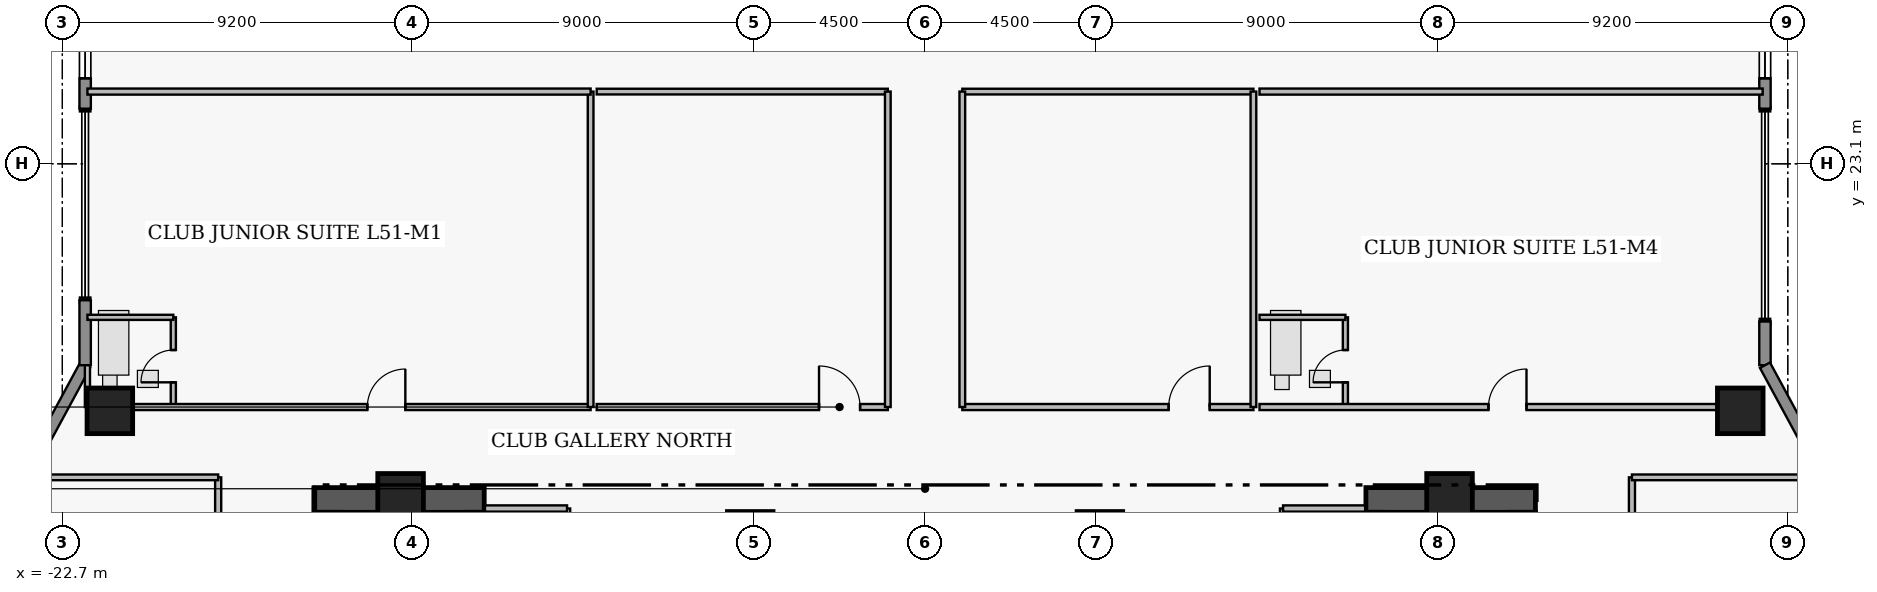
"""IFC4 building model, lengths in metres.
Left out: names, types, materials, properties, quantities, classifications, styles, units other than length and angle.
Written with IfcOpenShell. Run it as: python <this file> out.ifc"""

import sys

from ifc_helpers import new_model, si_unit, direction, frame, frame_2d, origin, origin_2d, place, context, subcontext, project, spatial, rectangle, extrude, element, fill, save


model = new_model("IFC4")
c1 = context("Model", 3, precision=1e-05, world=origin(), true_north=direction((0.0, 1.0)))
c2 = subcontext(c1, "Body", "Model", "MODEL_VIEW")
j1 = project(units=[si_unit("LENGTHUNIT", "METRE"), si_unit("PLANEANGLEUNIT", "RADIAN")], contexts=[c1])
p1 = place(None, origin())
s1 = spatial("IfcSite", under=j1, at=p1, CompositionType="ELEMENT")
p2 = place(p1, origin())
s2 = spatial("IfcBuilding", under=s1, at=p2, CompositionType="ELEMENT")
p3 = place(p2, frame((0.0, 0.0, 203.65)))
s3 = spatial("IfcBuildingStorey", under=s2, at=p3, CompositionType="ELEMENT", Elevation=203.65)
for number, where, z_axis, x_axis in (
    (1, (-16.06, 14.255, 0.0), (0.0, 0.0, 1.0), (1.0, 0.0, 0.0)),
    (2, (11.6, 14.255, 0.0), (0.0, 0.0, 1.0), (1.0, 0.0, 0.0)),
):
    element("IfcWall", number, at=place(p3, frame(where, z_axis=z_axis, x_axis=x_axis)), inside=s3, PredefinedType="SHEAR", context=c2, shape_type="SweptSolid", body=[
        extrude(rectangle(XDim=4.46, YDim=0.65, at=frame_2d((2.23, 0.0))), origin(), (0.0, 0.0, 1.0), 3.56),
    ])
for number, where, z_axis, x_axis in (
    (3, (-13.8, 14.35, 0.0), (0.0, 0.0, 1.0), (1.0, 0.0, 0.0)),
    (4, (-4.6, 13.35, 0.0), (0.0, 0.0, 1.0), (1.0, 0.0, 0.0)),
    (5, (4.6, 13.35, 0.0), (0.0, 0.0, 1.0), (1.0, 0.0, 0.0)),
    (6, (13.8, 14.35, 0.0), (0.0, 0.0, 1.0), (1.0, 0.0, 0.0)),
    (7, (-21.45, 16.6, 0.0), (0.0, 0.0, 1.0), (1.0, 0.0, 0.0)),
    (8, (21.45, 16.6, 0.0), (0.0, 0.0, 1.0), (1.0, 0.0, 0.0)),
):
    element("IfcColumn", number, at=place(p3, frame(where, z_axis=z_axis, x_axis=x_axis)), inside=s3, PredefinedType="COLUMN", context=c2, shape_type="SweptSolid", body=[
        extrude(rectangle(XDim=1.2, YDim=1.2, at=origin_2d()), origin(), (0.0, 0.0, 1.0), 3.75),
    ])
p4 = place(p3, frame((-24.7, 13.0, 0.0), z_axis=(0.0, 0.0, 1.0), x_axis=(0.476258655584, 0.879305233114, 0.0)))
e9 = element("IfcWall", 9, at=p4, inside=s3, PredefinedType="STANDARD", context=c2, shape_type="SweptSolid", body=[
    extrude(rectangle(XDim=5.459, YDim=0.3, at=frame_2d((2.729, 0.0))), origin(), (0.0, 0.0, 1.0), 3.53),
])
p5 = place(p3, frame((-22.1, 17.8, 0.0), z_axis=(0.0, 0.0, 1.0), x_axis=(0.0, 1.0, 0.0)))
e10 = element("IfcWall", 10, at=p5, inside=s3, PredefinedType="STANDARD", context=c2, shape_type="SweptSolid", body=[
    extrude(rectangle(XDim=1.71, YDim=0.3, at=frame_2d((0.855, 0.0))), origin(), (0.0, 0.0, 1.0), 3.53),
])
p6 = place(p3, frame((-22.1, 24.55, 0.0), z_axis=(0.0, 0.0, 1.0), x_axis=(0.0, 1.0, 0.0)))
e11 = element("IfcWall", 11, at=p6, inside=s3, PredefinedType="STANDARD", context=c2, shape_type="SweptSolid", body=[
    extrude(rectangle(XDim=5.65, YDim=0.3, at=frame_2d((2.825, 0.0))), origin(), (0.0, 0.0, 1.0), 3.53),
])
p7 = place(p6, frame((0.8, 0.0, 0.95)))
e12 = element("IfcOpeningElement", 12, at=p7, cuts=e11, PredefinedType="OPENING", context=c2, shape_type="SweptSolid", body=[
    extrude(rectangle(XDim=1.15, YDim=1.55, at=frame_2d((0.575, 0.775))), frame((0.0, 0.16, 0.0), z_axis=(0.0, -1.0, 0.0), x_axis=(1.0, 0.0, 0.0)), (0.0, 0.0, 1.0), 0.32),
])
p8 = place(p6, frame((2.905, 0.0, 0.95)))
e13 = element("IfcOpeningElement", 13, at=p8, cuts=e11, PredefinedType="OPENING", context=c2, shape_type="SweptSolid", body=[
    extrude(rectangle(XDim=1.15, YDim=1.55, at=frame_2d((0.575, 0.775))), frame((0.0, 0.16, 0.0), z_axis=(0.0, -1.0, 0.0), x_axis=(1.0, 0.0, 0.0)), (0.0, 0.0, 1.0), 0.32),
])
p9 = place(p3, frame((22.1, 30.2, 0.0), z_axis=(0.0, 0.0, 1.0), x_axis=(0.0, -1.0, 0.0)))
e14 = element("IfcWall", 14, at=p9, inside=s3, PredefinedType="STANDARD", context=c2, shape_type="SweptSolid", body=[
    extrude(rectangle(XDim=5.65, YDim=0.3, at=frame_2d((2.825, 0.0))), origin(), (0.0, 0.0, 1.0), 3.53),
])
p10 = place(p9, frame((0.935, 0.0, 0.85)))
e15 = element("IfcOpeningElement", 15, at=p10, cuts=e14, PredefinedType="OPENING", context=c2, shape_type="SweptSolid", body=[
    extrude(rectangle(XDim=1.6, YDim=1.8, at=frame_2d((0.8, 0.9))), frame((0.0, 0.16, 0.0), z_axis=(0.0, -1.0, 0.0), x_axis=(1.0, 0.0, 0.0)), (0.0, 0.0, 1.0), 0.32),
])
p11 = place(p9, frame((3.7, 0.0, 0.95)))
e16 = element("IfcOpeningElement", 16, at=p11, cuts=e14, PredefinedType="OPENING", context=c2, shape_type="SweptSolid", body=[
    extrude(rectangle(XDim=1.15, YDim=1.55, at=frame_2d((0.575, 0.775))), frame((0.0, 0.16, 0.0), z_axis=(0.0, -1.0, 0.0), x_axis=(1.0, 0.0, 0.0)), (0.0, 0.0, 1.0), 0.32),
])
p12 = place(p3, frame((22.1, 18.95, 0.0), z_axis=(0.0, 0.0, 1.0), x_axis=(0.0, -1.0, 0.0)))
e17 = element("IfcWall", 17, at=p12, inside=s3, PredefinedType="STANDARD", context=c2, shape_type="SweptSolid", body=[
    extrude(rectangle(XDim=1.15, YDim=0.3, at=frame_2d((0.575, 0.0))), origin(), (0.0, 0.0, 1.0), 3.53),
])
p13 = place(p3, frame((22.1, 17.8, 0.0), z_axis=(0.0, 0.0, 1.0), x_axis=(0.476258655584, -0.879305233114, 0.0)))
e18 = element("IfcWall", 18, at=p13, inside=s3, PredefinedType="STANDARD", context=c2, shape_type="SweptSolid", body=[
    extrude(rectangle(XDim=5.459, YDim=0.3, at=frame_2d((2.729, 0.0))), origin(), (0.0, 0.0, 1.0), 3.53),
])
p14 = place(p3, frame((-19.78, 16.7, 0.0), z_axis=(0.0, 0.0, 1.0), x_axis=(0.0, 1.0, 0.0)))
e19 = element("IfcWall", 19, at=p14, inside=s3, PredefinedType="PLUMBINGWALL", context=c2, shape_type="SweptSolid", body=[
    extrude(rectangle(XDim=2.36, YDim=0.135, at=frame_2d((1.18, 0.0))), origin(), (0.0, 0.0, 1.0), 3.53),
])
p15 = place(p14, frame((0.65, 0.0, 0.0)))
e20 = element("IfcOpeningElement", 20, at=p15, cuts=e19, PredefinedType="OPENING", context=c2, shape_type="SweptSolid", body=[
    extrude(rectangle(XDim=0.85, YDim=2.1, at=frame_2d((0.425, 1.05))), frame((0.0, 0.077, 0.0), z_axis=(0.0, -1.0, 0.0), x_axis=(1.0, 0.0, 0.0)), (0.0, 0.0, 1.0), 0.155),
])
p16 = place(p3, frame((-22.04, 16.7, 0.0), z_axis=(0.0, 0.0, 1.0), x_axis=(1.0, 0.0, 0.0)))
e21 = element("IfcWall", 21, at=p16, inside=s3, PredefinedType="PARTITIONING", context=c2, shape_type="SweptSolid", body=[
    extrude(rectangle(XDim=13.24, YDim=0.16, at=frame_2d((6.62, 0.0))), origin(), (0.0, 0.0, 1.0), 3.124),
])
p17 = place(p16, frame((7.365, 0.0, 0.0)))
e22 = element("IfcOpeningElement", 22, at=p17, cuts=e21, PredefinedType="OPENING", context=c2, shape_type="SweptSolid", body=[
    extrude(rectangle(XDim=1.0, YDim=2.15, at=frame_2d((0.5, 1.075))), frame((0.0, 0.09, 0.0), z_axis=(0.0, -1.0, 0.0), x_axis=(1.0, 0.0, 0.0)), (0.0, 0.0, 1.0), 0.18),
])
p18 = place(p3, frame((-8.64, 16.7, 0.0), z_axis=(0.0, 0.0, 1.0), x_axis=(1.0, 0.0, 0.0)))
e23 = element("IfcWall", 23, at=p18, inside=s3, PredefinedType="PARTITIONING", context=c2, shape_type="SweptSolid", body=[
    extrude(rectangle(XDim=7.66, YDim=0.16, at=frame_2d((3.83, 0.0))), origin(), (0.0, 0.0, 1.0), 3.124),
])
p19 = place(p18, frame((5.85, 0.0, 0.0)))
e24 = element("IfcOpeningElement", 24, at=p19, cuts=e23, PredefinedType="OPENING", context=c2, shape_type="SweptSolid", body=[
    extrude(rectangle(XDim=1.08, YDim=2.18, at=frame_2d((0.54, 1.09))), frame((0.0, 0.09, 0.0), z_axis=(0.0, -1.0, 0.0), x_axis=(1.0, 0.0, 0.0)), (0.0, 0.0, 1.0), 0.18),
])
p20 = place(p3, frame((0.98, 16.7, 0.0), z_axis=(0.0, 0.0, 1.0), x_axis=(1.0, 0.0, 0.0)))
e25 = element("IfcWall", 25, at=p20, inside=s3, PredefinedType="PARTITIONING", context=c2, shape_type="SweptSolid", body=[
    extrude(rectangle(XDim=7.66, YDim=0.16, at=frame_2d((3.83, 0.0))), origin(), (0.0, 0.0, 1.0), 3.124),
])
p21 = place(p20, frame((5.43, 0.0, 0.0)))
e26 = element("IfcOpeningElement", 26, at=p21, cuts=e25, PredefinedType="OPENING", context=c2, shape_type="SweptSolid", body=[
    extrude(rectangle(XDim=1.08, YDim=2.18, at=frame_2d((0.54, 1.09))), frame((0.0, 0.09, 0.0), z_axis=(0.0, -1.0, 0.0), x_axis=(1.0, 0.0, 0.0)), (0.0, 0.0, 1.0), 0.18),
])
p22 = place(p3, frame((11.06, 16.7, 0.0), z_axis=(0.0, 0.0, 1.0), x_axis=(0.0, 1.0, 0.0)))
e27 = element("IfcWall", 27, at=p22, inside=s3, PredefinedType="PLUMBINGWALL", context=c2, shape_type="SweptSolid", body=[
    extrude(rectangle(XDim=2.36, YDim=0.135, at=frame_2d((1.18, 0.0))), origin(), (0.0, 0.0, 1.0), 3.53),
])
p23 = place(p22, frame((0.65, 0.0, 0.0)))
e28 = element("IfcOpeningElement", 28, at=p23, cuts=e27, PredefinedType="OPENING", context=c2, shape_type="SweptSolid", body=[
    extrude(rectangle(XDim=0.85, YDim=2.1, at=frame_2d((0.425, 1.05))), frame((0.0, 0.077, 0.0), z_axis=(0.0, -1.0, 0.0), x_axis=(1.0, 0.0, 0.0)), (0.0, 0.0, 1.0), 0.155),
])
p24 = place(p3, frame((8.8, 16.7, 0.0), z_axis=(0.0, 0.0, 1.0), x_axis=(1.0, 0.0, 0.0)))
e29 = element("IfcWall", 29, at=p24, inside=s3, PredefinedType="PARTITIONING", context=c2, shape_type="SweptSolid", body=[
    extrude(rectangle(XDim=13.24, YDim=0.16, at=frame_2d((6.62, 0.0))), origin(), (0.0, 0.0, 1.0), 3.124),
])
p25 = place(p24, frame((6.025, 0.0, 0.0)))
e30 = element("IfcOpeningElement", 30, at=p25, cuts=e29, PredefinedType="OPENING", context=c2, shape_type="SweptSolid", body=[
    extrude(rectangle(XDim=1.0, YDim=2.15, at=frame_2d((0.5, 1.075))), frame((0.0, 0.09, 0.0), z_axis=(0.0, -1.0, 0.0), x_axis=(1.0, 0.0, 0.0)), (0.0, 0.0, 1.0), 0.18),
])
p26 = place(p3, frame((18.6, 10.18, 0.0), z_axis=(0.0, 0.0, 1.0), x_axis=(0.0, 1.0, 0.0)))
e31 = element("IfcWall", 31, at=p26, inside=s3, PredefinedType="PARTITIONING", context=c2, shape_type="SweptSolid", body=[
    extrude(rectangle(XDim=4.67, YDim=0.16, at=frame_2d((2.335, 0.0))), origin(), (0.0, 0.0, 1.0), 3.53),
])
p27 = place(p26, frame((1.875, 0.0, 0.0)))
e32 = element("IfcOpeningElement", 32, at=p27, cuts=e31, PredefinedType="OPENING", context=c2, shape_type="SweptSolid", body=[
    extrude(rectangle(XDim=0.92, YDim=2.12, at=frame_2d((0.46, 1.06))), frame((0.0, 0.09, 0.0), z_axis=(0.0, -1.0, 0.0), x_axis=(1.0, 0.0, 0.0)), (0.0, 0.0, 1.0), 0.18),
])
p28 = place(p3, frame((-18.6, 8.06, 0.0), z_axis=(0.0, 0.0, 1.0), x_axis=(0.0, 1.0, 0.0)))
e33 = element("IfcWall", 33, at=p28, inside=s3, PredefinedType="PARTITIONING", context=c2, shape_type="SweptSolid", body=[
    extrude(rectangle(XDim=6.79, YDim=0.16, at=frame_2d((3.395, 0.0))), origin(), (0.0, 0.0, 1.0), 3.53),
])
p29 = place(p28, frame((2.92, 0.0, 0.0)))
e34 = element("IfcOpeningElement", 34, at=p29, cuts=e33, PredefinedType="OPENING", context=c2, shape_type="SweptSolid", body=[
    extrude(rectangle(XDim=0.95, YDim=2.15, at=frame_2d((0.475, 1.075))), frame((0.0, 0.09, 0.0), z_axis=(0.0, -1.0, 0.0), x_axis=(1.0, 0.0, 0.0)), (0.0, 0.0, 1.0), 0.18),
])
p30 = place(p3, frame((-9.42, 11.07, 0.0), z_axis=(0.0, 0.0, 1.0), x_axis=(0.0, 1.0, 0.0)))
e35 = element("IfcWall", 35, at=p30, inside=s3, PredefinedType="PARTITIONING", context=c2, shape_type="SweptSolid", body=[
    extrude(rectangle(XDim=2.96, YDim=0.165, at=frame_2d((1.48, 0.0))), origin(), (0.0, 0.0, 1.0), 3.53),
])
p31 = place(p3, frame((-11.58, 14.03, 0.0), z_axis=(0.0, 0.0, 1.0), x_axis=(1.0, 0.0, 0.0)))
e36 = element("IfcWall", 36, at=p31, inside=s3, PredefinedType="PARTITIONING", context=c2, shape_type="SweptSolid", body=[
    extrude(rectangle(XDim=2.16, YDim=0.165, at=frame_2d((1.08, 0.0))), origin(), (0.0, 0.0, 1.0), 3.53),
])
p32 = place(p3, frame((9.42, 11.07, 0.0), z_axis=(0.0, 0.0, 1.0), x_axis=(0.0, 1.0, 0.0)))
e37 = element("IfcWall", 37, at=p32, inside=s3, PredefinedType="PARTITIONING", context=c2, shape_type="SweptSolid", body=[
    extrude(rectangle(XDim=2.96, YDim=0.165, at=frame_2d((1.48, 0.0))), origin(), (0.0, 0.0, 1.0), 3.53),
])
p33 = place(p3, frame((9.42, 14.03, 0.0), z_axis=(0.0, 0.0, 1.0), x_axis=(1.0, 0.0, 0.0)))
e38 = element("IfcWall", 38, at=p33, inside=s3, PredefinedType="PARTITIONING", context=c2, shape_type="SweptSolid", body=[
    extrude(rectangle(XDim=2.16, YDim=0.165, at=frame_2d((1.08, 0.0))), origin(), (0.0, 0.0, 1.0), 3.53),
])
p34 = place(p3, frame((-22.04, 19.06, 0.0), z_axis=(0.0, 0.0, 1.0), x_axis=(1.0, 0.0, 0.0)))
e39 = element("IfcWall", 39, at=p34, inside=s3, PredefinedType="PLUMBINGWALL", context=c2, shape_type="SweptSolid", body=[
    extrude(rectangle(XDim=2.26, YDim=0.135, at=frame_2d((1.13, 0.0))), origin(), (0.0, 0.0, 1.0), 3.53),
])
p35 = place(p3, frame((-22.04, 16.7, 0.0), z_axis=(0.0, 0.0, 1.0), x_axis=(0.0, 1.0, 0.0)))
e40 = element("IfcWall", 40, at=p35, inside=s3, PredefinedType="PLUMBINGWALL", context=c2, shape_type="SweptSolid", body=[
    extrude(rectangle(XDim=1.1, YDim=0.135, at=frame_2d((0.55, 0.0))), origin(), (0.0, 0.0, 1.0), 3.53),
])
p36 = place(p3, frame((-8.8, 16.7, 0.0), z_axis=(0.0, 0.0, 1.0), x_axis=(0.0, 1.0, 0.0)))
e41 = element("IfcWall", 41, at=p36, inside=s3, PredefinedType="PARTITIONING", context=c2, shape_type="SweptSolid", body=[
    extrude(rectangle(XDim=8.3, YDim=0.15, at=frame_2d((4.15, 0.0))), origin(), (0.0, 0.0, 1.0), 3.53),
])
p37 = place(p3, frame((-22.04, 25.0, 0.0), z_axis=(0.0, 0.0, 1.0), x_axis=(1.0, 0.0, 0.0)))
e42 = element("IfcWall", 42, at=p37, inside=s3, PredefinedType="PARTITIONING", context=c2, shape_type="SweptSolid", body=[
    extrude(rectangle(XDim=13.24, YDim=0.16, at=frame_2d((6.62, 0.0))), origin(), (0.0, 0.0, 1.0), 3.124),
])
p38 = place(p3, frame((-8.64, 25.0, 0.0), z_axis=(0.0, 0.0, 1.0), x_axis=(1.0, 0.0, 0.0)))
e43 = element("IfcWall", 43, at=p38, inside=s3, PredefinedType="PARTITIONING", context=c2, shape_type="SweptSolid", body=[
    extrude(rectangle(XDim=7.66, YDim=0.15, at=frame_2d((3.83, 0.0))), origin(), (0.0, 0.0, 1.0), 3.124),
])
p39 = place(p3, frame((-0.98, 16.7, 0.0), z_axis=(0.0, 0.0, 1.0), x_axis=(0.0, 1.0, 0.0)))
e44 = element("IfcWall", 44, at=p39, inside=s3, PredefinedType="PARTITIONING", context=c2, shape_type="SweptSolid", body=[
    extrude(rectangle(XDim=8.3, YDim=0.15, at=frame_2d((4.15, 0.0))), origin(), (0.0, 0.0, 1.0), 3.53),
])
p40 = place(p3, frame((0.98, 25.0, 0.0), z_axis=(0.0, 0.0, 1.0), x_axis=(1.0, 0.0, 0.0)))
e45 = element("IfcWall", 45, at=p40, inside=s3, PredefinedType="PARTITIONING", context=c2, shape_type="SweptSolid", body=[
    extrude(rectangle(XDim=7.66, YDim=0.15, at=frame_2d((3.83, 0.0))), origin(), (0.0, 0.0, 1.0), 3.124),
])
for number, where, z_axis, x_axis in (
    (46, (0.98, 16.7, 0.0), (0.0, 0.0, 1.0), (0.0, 1.0, 0.0)),
    (47, (8.64, 16.7, 0.0), (0.0, 0.0, 1.0), (0.0, 1.0, 0.0)),
):
    element("IfcWall", number, at=place(p3, frame(where, z_axis=z_axis, x_axis=x_axis)), inside=s3, PredefinedType="PARTITIONING", context=c2, shape_type="SweptSolid", body=[
        extrude(rectangle(XDim=8.3, YDim=0.15, at=frame_2d((4.15, 0.0))), origin(), (0.0, 0.0, 1.0), 3.53),
    ])
p41 = place(p3, frame((8.8, 19.06, 0.0), z_axis=(0.0, 0.0, 1.0), x_axis=(1.0, 0.0, 0.0)))
e48 = element("IfcWall", 48, at=p41, inside=s3, PredefinedType="PLUMBINGWALL", context=c2, shape_type="SweptSolid", body=[
    extrude(rectangle(XDim=2.26, YDim=0.135, at=frame_2d((1.13, 0.0))), origin(), (0.0, 0.0, 1.0), 3.124),
])
p42 = place(p3, frame((8.8, 25.0, 0.0), z_axis=(0.0, 0.0, 1.0), x_axis=(1.0, 0.0, 0.0)))
e49 = element("IfcWall", 49, at=p42, inside=s3, PredefinedType="PARTITIONING", context=c2, shape_type="SweptSolid", body=[
    extrude(rectangle(XDim=13.24, YDim=0.16, at=frame_2d((6.62, 0.0))), origin(), (0.0, 0.0, 1.0), 3.124),
])
for number, where, z_axis, x_axis in (
    (50, (18.6, 14.85, 0.0), (0.0, 0.0, 1.0), (1.0, 0.0, 0.0)),
    (51, (-23.638, 14.85, 0.0), (0.0, 0.0, 1.0), (1.0, 0.0, 0.0)),
):
    element("IfcWall", number, at=place(p3, frame(where, z_axis=z_axis, x_axis=x_axis)), inside=s3, PredefinedType="PARTITIONING", context=c2, shape_type="SweptSolid", body=[
        extrude(rectangle(XDim=5.038, YDim=0.15, at=frame_2d((2.519, 0.0))), origin(), (0.0, 0.0, 1.0), 3.53),
    ])
p43 = place(p7, origin())
e52 = element("IfcWindow", 52, at=p43, inside=s3, PartitioningType="SINGLE_PANEL", PredefinedType="WINDOW", context=c2, shape_type="SweptSolid", body=[
    extrude(rectangle(XDim=1.15, YDim=1.55, at=frame_2d((0.575, 0.775))), frame((0.0, 0.03, 0.0), z_axis=(0.0, -1.0, 0.0), x_axis=(1.0, 0.0, 0.0)), (0.0, 0.0, 1.0), 0.06),
])
fill(e12, e52)
p44 = place(p11, origin())
e53 = element("IfcWindow", 53, at=p44, inside=s3, PartitioningType="SINGLE_PANEL", PredefinedType="WINDOW", context=c2, shape_type="SweptSolid", body=[
    extrude(rectangle(XDim=1.15, YDim=1.55, at=frame_2d((0.575, 0.775))), frame((0.0, 0.03, 0.0), z_axis=(0.0, -1.0, 0.0), x_axis=(1.0, 0.0, 0.0)), (0.0, 0.0, 1.0), 0.06),
])
fill(e16, e53)
p45 = place(p15, origin())
e54 = element("IfcDoor", 54, at=p45, inside=s3, OperationType="SINGLE_SWING_LEFT", PredefinedType="DOOR", context=c2, shape_type="SweptSolid", body=[
    extrude(rectangle(XDim=0.85, YDim=2.1, at=frame_2d((0.425, 1.05))), frame((0.0, 0.025, 0.0), z_axis=(0.0, -1.0, 0.0), x_axis=(1.0, 0.0, 0.0)), (0.0, 0.0, 1.0), 0.05),
])
fill(e20, e54)
p46 = place(p17, origin())
e55 = element("IfcDoor", 55, at=p46, inside=s3, OperationType="SINGLE_SWING_RIGHT", PredefinedType="DOOR", context=c2, shape_type="SweptSolid", body=[
    extrude(rectangle(XDim=1.0, YDim=2.15, at=frame_2d((0.5, 1.075))), frame((0.0, 0.025, 0.0), z_axis=(0.0, -1.0, 0.0), x_axis=(1.0, 0.0, 0.0)), (0.0, 0.0, 1.0), 0.05),
])
fill(e22, e55)
p47 = place(p19, origin())
e56 = element("IfcDoor", 56, at=p47, inside=s3, OperationType="SINGLE_SWING_LEFT", PredefinedType="DOOR", context=c2, shape_type="SweptSolid", body=[
    extrude(rectangle(XDim=1.08, YDim=2.18, at=frame_2d((0.54, 1.09))), frame((0.0, 0.025, 0.0), z_axis=(0.0, -1.0, 0.0), x_axis=(1.0, 0.0, 0.0)), (0.0, 0.0, 1.0), 0.05),
])
fill(e24, e56)
p48 = place(p21, origin())
e57 = element("IfcDoor", 57, at=p48, inside=s3, OperationType="SINGLE_SWING_RIGHT", PredefinedType="DOOR", context=c2, shape_type="SweptSolid", body=[
    extrude(rectangle(XDim=1.08, YDim=2.18, at=frame_2d((0.54, 1.09))), frame((0.0, 0.025, 0.0), z_axis=(0.0, -1.0, 0.0), x_axis=(1.0, 0.0, 0.0)), (0.0, 0.0, 1.0), 0.05),
])
fill(e26, e57)
p49 = place(p23, origin())
e58 = element("IfcDoor", 58, at=p49, inside=s3, OperationType="SINGLE_SWING_LEFT", PredefinedType="DOOR", context=c2, shape_type="SweptSolid", body=[
    extrude(rectangle(XDim=0.85, YDim=2.1, at=frame_2d((0.425, 1.05))), frame((0.0, 0.025, 0.0), z_axis=(0.0, -1.0, 0.0), x_axis=(1.0, 0.0, 0.0)), (0.0, 0.0, 1.0), 0.05),
])
fill(e28, e58)
p50 = place(p25, origin())
e59 = element("IfcDoor", 59, at=p50, inside=s3, OperationType="SINGLE_SWING_RIGHT", PredefinedType="DOOR", context=c2, shape_type="SweptSolid", body=[
    extrude(rectangle(XDim=1.0, YDim=2.15, at=frame_2d((0.5, 1.075))), frame((0.0, 0.025, 0.0), z_axis=(0.0, -1.0, 0.0), x_axis=(1.0, 0.0, 0.0)), (0.0, 0.0, 1.0), 0.05),
])
fill(e30, e59)
save(model, sys.argv[1])
